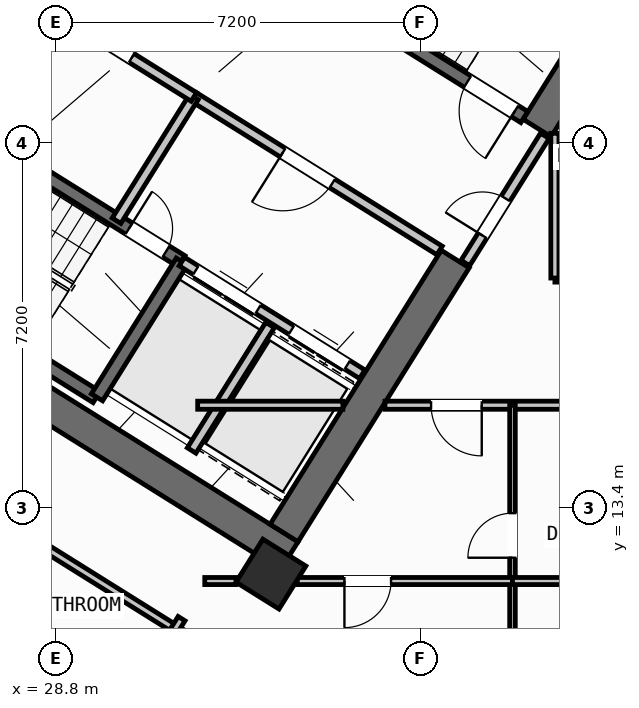
"""IFC4 building model, lengths in metres.
Left out: names, types, materials, properties, quantities, classifications, styles, units other than length and angle.
Written with IfcOpenShell. Run it as: python <this file> out.ifc"""

import sys

from ifc_helpers import new_model, si_unit, direction, frame, frame_2d, origin, origin_2d, place, context, subcontext, project, spatial, rectangle, hollow_rectangle, extrude, source, transform, mapped, element, fill, save


model = new_model("IFC4")
c1 = context("Model", 3, precision=1e-05, world=origin(), true_north=direction((0.0, 1.0)))
c2 = subcontext(c1, "Body", "Model", "MODEL_VIEW")
j1 = project(units=[si_unit("LENGTHUNIT", "METRE"), si_unit("PLANEANGLEUNIT", "RADIAN")], contexts=[c1])
p1 = place(None, origin())
s1 = spatial("IfcSite", under=j1, at=p1, CompositionType="ELEMENT")
p2 = place(p1, origin())
s2 = spatial("IfcBuilding", under=s1, at=p2, CompositionType="ELEMENT")
p3 = place(p2, frame((0.0, 0.0, 56.4)))
s3 = spatial("IfcBuildingStorey", under=s2, at=p3, CompositionType="ELEMENT", Elevation=56.4)
p4 = place(p3, frame((33.409, 12.45, 0.0), z_axis=(0.0, 0.0, 1.0), x_axis=(-0.848051132073, 0.529914405721, 0.0)))
e1 = element("IfcWall", 1, at=p4, inside=s3, PredefinedType="SHEAR", context=c2, shape_type="SweptSolid", body=[
    extrude(rectangle(XDim=13.24, YDim=0.65, at=frame_2d((6.62, 0.0))), origin(), (0.0, 0.0, 1.0), 3.35),
])
p5 = place(p3, frame((40.168, 23.88, 0.0), z_axis=(0.0, 0.0, 1.0), x_axis=(-0.529893103397, -0.8480644427, 0.0)))
e2 = element("IfcWall", 2, at=p5, inside=s3, PredefinedType="SHEAR", context=c2, shape_type="SweptSolid", body=[
    extrude(rectangle(XDim=3.525, YDim=0.65, at=frame_2d((1.763, 0.0))), origin(), (0.0, 0.0, 1.0), 3.35),
])
p6 = place(p3, frame((36.683, 18.304, 0.0), z_axis=(0.0, 0.0, 1.0), x_axis=(-0.529899109053, -0.848060690178, 0.0)))
e3 = element("IfcWall", 3, at=p6, inside=s3, PredefinedType="SHEAR", context=c2, shape_type="SweptSolid", body=[
    extrude(rectangle(XDim=6.375, YDim=0.65, at=frame_2d((3.188, 0.0))), origin(), (0.0, 0.0, 1.0), 3.35),
])
m1 = source(origin(), c2, "Body", "SweptSolid", [
    extrude(hollow_rectangle(XDim=1.0, YDim=1.0, WallThickness=0.04, at=origin_2d()), origin(), (0.0, 0.0, 1.0), 3.6),
])
p7 = place(p3, frame((33.046, 12.087, 0.0), z_axis=(0.0, 0.0, 1.0), x_axis=(-0.848048096156, 0.529919264233, 0.0)))
e4 = element("IfcColumn", 4, at=p7, inside=s3, PredefinedType="COLUMN", context=c2, shape_type="MappedRepresentation", body=[
    mapped(m1, transform((0.0, 0.0, 0.0), scale=1.0)),
])
p8 = place(p3, frame((29.268, 6.429, 0.0), z_axis=(0.0, 0.0, 1.0), x_axis=(-0.848049971435, 0.529916263149, 0.0)))
e5 = element("IfcWall", 5, at=p8, inside=s3, PredefinedType="STANDARD", context=c2, shape_type="SweptSolid", body=[
    extrude(rectangle(XDim=31.588, YDim=0.32, at=frame_2d((15.794, 0.0))), origin(), (0.0, 0.0, 1.0), 3.35),
])
p9 = place(p8, frame((16.235, 0.0, 0.0)))
e6 = element("IfcOpeningElement", 6, at=p9, cuts=e5, PredefinedType="OPENING", context=c2, shape_type="SweptSolid", body=[
    extrude(rectangle(XDim=1.2, YDim=2.15, at=frame_2d((0.6, 1.075))), frame((0.0, 0.17, 0.0), z_axis=(0.0, -1.0, 0.0), x_axis=(1.0, 0.0, 0.0)), (0.0, 0.0, 1.0), 0.34),
])
p10 = place(p8, frame((2.989, 0.0, 0.8)))
e7 = element("IfcOpeningElement", 7, at=p10, cuts=e5, PredefinedType="OPENING", context=c2, shape_type="SweptSolid", body=[
    extrude(rectangle(XDim=2.1, YDim=1.55, at=frame_2d((1.05, 0.775))), frame((0.0, 0.17, 0.0), z_axis=(0.0, -1.0, 0.0), x_axis=(1.0, 0.0, 0.0)), (0.0, 0.0, 1.0), 0.34),
])
p11 = place(p8, frame((8.359, 0.0, 0.8)))
e8 = element("IfcOpeningElement", 8, at=p11, cuts=e5, PredefinedType="OPENING", context=c2, shape_type="SweptSolid", body=[
    extrude(rectangle(XDim=2.1, YDim=1.55, at=frame_2d((1.05, 0.775))), frame((0.0, 0.17, 0.0), z_axis=(0.0, -1.0, 0.0), x_axis=(1.0, 0.0, 0.0)), (0.0, 0.0, 1.0), 0.34),
])
p12 = place(p8, frame((13.284, 0.0, 0.95)))
e9 = element("IfcOpeningElement", 9, at=p12, cuts=e5, PredefinedType="OPENING", context=c2, shape_type="SweptSolid", body=[
    extrude(rectangle(XDim=1.2, YDim=1.4, at=frame_2d((0.6, 0.7))), frame((0.0, 0.17, 0.0), z_axis=(0.0, -1.0, 0.0), x_axis=(1.0, 0.0, 0.0)), (0.0, 0.0, 1.0), 0.34),
])
p13 = place(p8, frame((22.374, 0.0, 0.95)))
e10 = element("IfcOpeningElement", 10, at=p13, cuts=e5, PredefinedType="OPENING", context=c2, shape_type="SweptSolid", body=[
    extrude(rectangle(XDim=1.2, YDim=1.4, at=frame_2d((0.6, 0.7))), frame((0.0, 0.17, 0.0), z_axis=(0.0, -1.0, 0.0), x_axis=(1.0, 0.0, 0.0)), (0.0, 0.0, 1.0), 0.34),
])
p14 = place(p8, frame((26.351, 0.0, 1.0)))
e11 = element("IfcOpeningElement", 11, at=p14, cuts=e5, PredefinedType="OPENING", context=c2, shape_type="SweptSolid", body=[
    extrude(rectangle(XDim=0.9, YDim=1.25, at=frame_2d((0.45, 0.625))), frame((0.0, 0.17, 0.0), z_axis=(0.0, -1.0, 0.0), x_axis=(1.0, 0.0, 0.0)), (0.0, 0.0, 1.0), 0.34),
])
p15 = place(p8, frame((29.052, 0.0, 0.85)))
e12 = element("IfcOpeningElement", 12, at=p15, cuts=e5, PredefinedType="OPENING", context=c2, shape_type="SweptSolid", body=[
    extrude(rectangle(XDim=1.8, YDim=1.5, at=frame_2d((0.9, 0.75))), frame((0.0, 0.17, 0.0), z_axis=(0.0, -1.0, 0.0), x_axis=(1.0, 0.0, 0.0)), (0.0, 0.0, 1.0), 0.34),
])
p16 = place(p3, frame((29.605, 15.581, 0.0), z_axis=(0.0, 0.0, 1.0), x_axis=(-0.848036911448, 0.529937163087, 0.0)))
e13 = element("IfcWall", 13, at=p16, inside=s3, PredefinedType="SHEAR", context=c2, shape_type="SweptSolid", body=[
    extrude(rectangle(XDim=7.46, YDim=0.26, at=frame_2d((3.73, 0.0))), origin(), (0.0, 0.0, 1.0), 3.35),
])
p17 = place(p3, frame((31.28, 18.261, 0.0), z_axis=(0.0, 0.0, 1.0), x_axis=(-0.848051618787, 0.529913626805, 0.0)))
e14 = element("IfcWall", 14, at=p17, inside=s3, PredefinedType="SHEAR", context=c2, shape_type="SweptSolid", body=[
    extrude(rectangle(XDim=7.46, YDim=0.26, at=frame_2d((3.73, 0.0))), origin(), (0.0, 0.0, 1.0), 3.35),
])
p18 = place(p17, frame((0.36, 0.0, 0.0)))
e15 = element("IfcOpeningElement", 15, at=p18, cuts=e14, PredefinedType="OPENING", context=c2, shape_type="SweptSolid", body=[
    extrude(rectangle(XDim=0.86, YDim=2.05, at=frame_2d((0.43, 1.025))), frame((0.0, 0.14, 0.0), z_axis=(0.0, -1.0, 0.0), x_axis=(1.0, 0.0, 0.0)), (0.0, 0.0, 1.0), 0.28),
])
p19 = place(p3, frame((31.288, 18.256, 0.0), z_axis=(0.0, 0.0, 1.0), x_axis=(-0.529943379326, -0.848033026897, 0.0)))
e16 = element("IfcWall", 16, at=p19, inside=s3, PredefinedType="SHEAR", context=c2, shape_type="SweptSolid", body=[
    extrude(rectangle(XDim=3.16, YDim=0.26, at=frame_2d((1.58, 0.0))), origin(), (0.0, 0.0, 1.0), 3.35),
])
p20 = place(p3, frame((38.046, 21.108, 0.0), z_axis=(0.0, 0.0, 1.0), x_axis=(-0.848054434086, 0.529909121291, 0.0)))
e17 = element("IfcWall", 17, at=p20, inside=s3, PredefinedType="SHEAR", context=c2, shape_type="SweptSolid", body=[
    extrude(rectangle(XDim=7.33, YDim=0.26, at=frame_2d((3.665, 0.0))), origin(), (0.0, 0.0, 1.0), 3.35),
])
p21 = place(p20, frame((0.22, 0.0, 0.0)))
e18 = element("IfcOpeningElement", 18, at=p21, cuts=e17, PredefinedType="OPENING", context=c2, shape_type="SweptSolid", body=[
    extrude(rectangle(XDim=1.1, YDim=2.1, at=frame_2d((0.55, 1.05))), frame((0.0, 0.14, 0.0), z_axis=(0.0, -1.0, 0.0), x_axis=(1.0, 0.0, 0.0)), (0.0, 0.0, 1.0), 0.28),
])
p22 = place(p3, frame((34.848, 16.031, 0.0), z_axis=(0.0, 0.0, 1.0), x_axis=(-0.848044042236, 0.529925751807, 0.0)))
e19 = element("IfcWall", 19, at=p22, inside=s3, PredefinedType="STANDARD", context=c2, shape_type="SweptSolid", body=[
    extrude(rectangle(XDim=4.198, YDim=0.2, at=frame_2d((2.099, 0.0))), origin(), (0.0, 0.0, 1.0), 3.34),
])
p23 = place(p22, frame((0.348, 0.0, 0.0)))
e20 = element("IfcOpeningElement", 20, at=p23, cuts=e19, PredefinedType="OPENING", context=c2, shape_type="SweptSolid", body=[
    extrude(rectangle(XDim=1.3, YDim=2.2, at=frame_2d((0.65, 1.1))), frame((0.0, 0.11, 0.0), z_axis=(0.0, -1.0, 0.0), x_axis=(1.0, 0.0, 0.0)), (0.0, 0.0, 1.0), 0.22),
])
p24 = place(p22, frame((2.423, 0.0, 0.0)))
e21 = element("IfcOpeningElement", 21, at=p24, cuts=e19, PredefinedType="OPENING", context=c2, shape_type="SweptSolid", body=[
    extrude(rectangle(XDim=1.45, YDim=2.25, at=frame_2d((0.725, 1.125))), frame((0.0, 0.11, 0.0), z_axis=(0.0, -1.0, 0.0), x_axis=(1.0, 0.0, 0.0)), (0.0, 0.0, 1.0), 0.22),
])
p25 = place(p3, frame((36.374, 18.474, 0.0), z_axis=(0.0, 0.0, 1.0), x_axis=(-0.848051071577, 0.529914502535, 0.0)))
e22 = element("IfcWall", 22, at=p25, inside=s3, PredefinedType="STANDARD", context=c2, shape_type="SweptSolid", body=[
    extrude(rectangle(XDim=5.718, YDim=0.2, at=frame_2d((2.859, 0.0))), origin(), (0.0, 0.0, 1.0), 3.34),
])
p26 = place(p25, frame((2.498, 0.0, 0.0)))
e23 = element("IfcOpeningElement", 23, at=p26, cuts=e22, PredefinedType="OPENING", context=c2, shape_type="SweptSolid", body=[
    extrude(rectangle(XDim=1.15, YDim=2.1, at=frame_2d((0.575, 1.05))), frame((0.0, 0.11, 0.0), z_axis=(0.0, -1.0, 0.0), x_axis=(1.0, 0.0, 0.0)), (0.0, 0.0, 1.0), 0.22),
])
p27 = place(p3, frame((33.029, 17.003, 0.0), z_axis=(0.0, 0.0, 1.0), x_axis=(-0.529916267533, -0.848049968695, 0.0)))
e24 = element("IfcWall", 24, at=p27, inside=s3, PredefinedType="STANDARD", context=c2, shape_type="SweptSolid", body=[
    extrude(rectangle(XDim=2.92, YDim=0.2, at=frame_2d((1.46, 0.0))), origin(), (0.0, 0.0, 1.0), 3.34),
])
for number, where, z_axis, x_axis in (
    (25, (31.525, 21.504, 0.0), (0.0, 0.0, 1.0), (-0.53, -0.848, 0.0)),
    (26, (28.71, 23.263, 0.0), (0.0, 0.0, 1.0), (-0.53, -0.848, 0.0)),
):
    element("IfcWall", number, at=place(p3, frame(where, z_axis=z_axis, x_axis=x_axis)), inside=s3, PredefinedType="STANDARD", context=c2, shape_type="SweptSolid", body=[
        extrude(rectangle(XDim=2.88, YDim=0.2, at=frame_2d((1.44, 0.0))), origin(), (0.0, 0.0, 1.0), 3.34),
    ])
p28 = place(p3, frame((31.525, 21.504, 0.0), z_axis=(0.0, 0.0, 1.0), x_axis=(-0.848044998614, 0.529924221305, 0.0)))
e27 = element("IfcWall", 27, at=p28, inside=s3, PredefinedType="STANDARD", context=c2, shape_type="SweptSolid", body=[
    extrude(rectangle(XDim=6.168, YDim=0.2, at=frame_2d((3.084, 0.0))), origin(), (0.0, 0.0, 1.0), 3.34),
])
p29 = place(p28, frame((4.4, 0.0, 0.0)))
e28 = element("IfcOpeningElement", 28, at=p29, cuts=e27, PredefinedType="OPENING", context=c2, shape_type="SweptSolid", body=[
    extrude(rectangle(XDim=0.86, YDim=2.05, at=frame_2d((0.43, 1.025))), frame((0.0, 0.11, 0.0), z_axis=(0.0, -1.0, 0.0), x_axis=(1.0, 0.0, 0.0)), (0.0, 0.0, 1.0), 0.22),
])
p30 = place(p28, frame((1.45, 0.0, 0.0)))
e29 = element("IfcOpeningElement", 29, at=p30, cuts=e27, PredefinedType="OPENING", context=c2, shape_type="SweptSolid", body=[
    extrude(rectangle(XDim=0.86, YDim=2.05, at=frame_2d((0.43, 1.025))), frame((0.0, 0.11, 0.0), z_axis=(0.0, -1.0, 0.0), x_axis=(1.0, 0.0, 0.0)), (0.0, 0.0, 1.0), 0.22),
])
p31 = place(p3, frame((32.164, 10.374, 0.0), z_axis=(0.0, 0.0, 1.0), x_axis=(-0.848044107957, 0.529925646633, 0.0)))
e30 = element("IfcWall", 30, at=p31, inside=s3, PredefinedType="PARTITIONING", context=c2, shape_type="SweptSolid", body=[
    extrude(rectangle(XDim=15.57, YDim=0.16, at=frame_2d((7.785, 0.0))), origin(), (0.0, 0.0, 1.0), 3.34),
])
p32 = place(p31, frame((10.83, 0.0, 0.0)))
e31 = element("IfcOpeningElement", 31, at=p32, cuts=e30, PredefinedType="OPENING", context=c2, shape_type="SweptSolid", body=[
    extrude(rectangle(XDim=1.0, YDim=2.1, at=frame_2d((0.5, 1.05))), frame((0.0, 0.09, 0.0), z_axis=(0.0, -1.0, 0.0), x_axis=(1.0, 0.0, 0.0)), (0.0, 0.0, 1.0), 0.18),
])
p33 = place(p3, frame((31.282, 11.208, 0.0), z_axis=(0.0, 0.0, 1.0), x_axis=(-0.529938869374, -0.84803584519, 0.0)))
e32 = element("IfcWall", 32, at=p33, inside=s3, PredefinedType="PARTITIONING", context=c2, shape_type="SweptSolid", body=[
    extrude(rectangle(XDim=5.48, YDim=0.16, at=frame_2d((2.74, 0.0))), origin(), (0.0, 0.0, 1.0), 3.34),
])
p34 = place(p3, frame((29.72, 8.859, 0.0), z_axis=(0.0, 0.0, 1.0), x_axis=(-0.848049134363, 0.529917602752, 0.0)))
e33 = element("IfcWall", 33, at=p34, inside=s3, PredefinedType="PLUMBINGWALL", context=c2, shape_type="SweptSolid", body=[
    extrude(rectangle(XDim=14.3, YDim=0.14, at=frame_2d((7.15, 0.0))), origin(), (0.0, 0.0, 1.0), 3.34),
])
p35 = place(p34, frame((9.57, 0.0, 0.0)))
e34 = element("IfcOpeningElement", 34, at=p35, cuts=e33, PredefinedType="OPENING", context=c2, shape_type="SweptSolid", body=[
    extrude(rectangle(XDim=0.92, YDim=2.08, at=frame_2d((0.46, 1.04))), frame((0.0, 0.08, 0.0), z_axis=(0.0, -1.0, 0.0), x_axis=(1.0, 0.0, 0.0)), (0.0, 0.0, 1.0), 0.16),
])
p36 = place(p3, frame((38.451, 20.737, 0.0), z_axis=(0.0, 0.0, 1.0), x_axis=(-0.529924799939, -0.848044637038, 0.0)))
e35 = element("IfcWall", 35, at=p36, inside=s3, PredefinedType="STANDARD", context=c2, shape_type="SweptSolid", body=[
    extrude(rectangle(XDim=2.96, YDim=0.2, at=frame_2d((1.48, 0.0))), origin(), (0.0, 0.0, 1.0), 3.34),
])
p37 = place(p36, frame((1.46, 0.0, 0.0)))
e36 = element("IfcOpeningElement", 36, at=p37, cuts=e35, PredefinedType="OPENING", context=c2, shape_type="SweptSolid", body=[
    extrude(rectangle(XDim=0.86, YDim=2.05, at=frame_2d((0.43, 1.025))), frame((0.0, 0.11, 0.0), z_axis=(0.0, -1.0, 0.0), x_axis=(1.0, 0.0, 0.0)), (0.0, 0.0, 1.0), 0.22),
])
p38 = place(p3, frame((31.6, 15.42, 0.0), z_axis=(0.0, 0.0, 1.0), x_axis=(1.0, 0.0, 0.0)))
e37 = element("IfcWall", 37, at=p38, inside=s3, PredefinedType="PARTITIONING", context=c2, shape_type="SweptSolid", body=[
    extrude(rectangle(XDim=2.866, YDim=0.16, at=frame_2d((1.433, 0.0))), origin(), (0.0, 0.0, 1.0), 3.34),
])
p39 = place(p3, frame((35.296, 15.42, 0.0), z_axis=(0.0, 0.0, 1.0), x_axis=(1.0, 0.0, 0.0)))
e38 = element("IfcWall", 38, at=p39, inside=s3, PredefinedType="PARTITIONING", context=c2, shape_type="SweptSolid", body=[
    extrude(rectangle(XDim=15.311, YDim=0.16, at=frame_2d((7.655, 0.0))), origin(), (0.0, 0.0, 1.0), 3.34),
])
p40 = place(p39, frame((0.91, 0.0, 0.0)))
e39 = element("IfcOpeningElement", 39, at=p40, cuts=e38, PredefinedType="OPENING", context=c2, shape_type="SweptSolid", body=[
    extrude(rectangle(XDim=1.0, YDim=2.1, at=frame_2d((0.5, 1.05))), frame((0.0, 0.09, 0.0), z_axis=(0.0, -1.0, 0.0), x_axis=(1.0, 0.0, 0.0)), (0.0, 0.0, 1.0), 0.18),
])
p41 = place(p39, frame((8.74, 0.0, 0.0)))
e40 = element("IfcOpeningElement", 40, at=p41, cuts=e38, PredefinedType="OPENING", context=c2, shape_type="SweptSolid", body=[
    extrude(rectangle(XDim=1.0, YDim=2.1, at=frame_2d((0.5, 1.05))), frame((0.0, 0.09, 0.0), z_axis=(0.0, -1.0, 0.0), x_axis=(1.0, 0.0, 0.0)), (0.0, 0.0, 1.0), 0.18),
])
p42 = place(p3, frame((38.65, 17.93, 0.0), z_axis=(0.0, 0.0, 1.0), x_axis=(1.0, 0.0, 0.0)))
e41 = element("IfcWall", 41, at=p42, inside=s3, PredefinedType="PARTITIONING", context=c2, shape_type="SweptSolid", body=[
    extrude(rectangle(XDim=9.95, YDim=0.16, at=frame_2d((4.975, 0.0))), origin(), (0.0, 0.0, 1.0), 3.34),
])
p43 = place(p42, frame((4.475, 0.0, 0.0)))
e42 = element("IfcOpeningElement", 42, at=p43, cuts=e41, PredefinedType="OPENING", context=c2, shape_type="SweptSolid", body=[
    extrude(rectangle(XDim=1.0, YDim=2.1, at=frame_2d((0.5, 1.05))), frame((0.0, 0.09, 0.0), z_axis=(0.0, -1.0, 0.0), x_axis=(1.0, 0.0, 0.0)), (0.0, 0.0, 1.0), 0.18),
])
p44 = place(p3, frame((38.65, 17.93, 0.0), z_axis=(0.0, 0.0, 1.0), x_axis=(0.0, 1.0, 0.0)))
e43 = element("IfcWall", 43, at=p44, inside=s3, PredefinedType="PARTITIONING", context=c2, shape_type="SweptSolid", body=[
    extrude(rectangle(XDim=2.857, YDim=0.16, at=frame_2d((1.428, 0.0))), origin(), (0.0, 0.0, 1.0), 3.34),
])
p45 = place(p3, frame((37.813, 1.96, 0.0), z_axis=(0.0, 0.0, 1.0), x_axis=(0.0, 1.0, 0.0)))
e44 = element("IfcWall", 44, at=p45, inside=s3, PredefinedType="PARTITIONING", context=c2, shape_type="SweptSolid", body=[
    extrude(rectangle(XDim=13.46, YDim=0.11, at=frame_2d((6.73, 0.0))), origin(), (0.0, 0.0, 1.0), 3.34),
])
p46 = place(p45, frame((5.5, 0.0, 0.0)))
e45 = element("IfcOpeningElement", 45, at=p46, cuts=e44, PredefinedType="OPENING", context=c2, shape_type="SweptSolid", body=[
    extrude(rectangle(XDim=0.92, YDim=2.08, at=frame_2d((0.46, 1.04))), frame((0.0, 0.065, 0.0), z_axis=(0.0, -1.0, 0.0), x_axis=(1.0, 0.0, 0.0)), (0.0, 0.0, 1.0), 0.13),
])
p47 = place(p45, frame((10.45, 0.0, 0.0)))
e46 = element("IfcOpeningElement", 46, at=p47, cuts=e44, PredefinedType="OPENING", context=c2, shape_type="SweptSolid", body=[
    extrude(rectangle(XDim=0.88, YDim=2.08, at=frame_2d((0.44, 1.04))), frame((0.0, 0.065, 0.0), z_axis=(0.0, -1.0, 0.0), x_axis=(1.0, 0.0, 0.0)), (0.0, 0.0, 1.0), 0.13),
])
p48 = place(p3, frame((31.74, 11.95, 0.0), z_axis=(0.0, 0.0, 1.0), x_axis=(1.0, 0.0, 0.0)))
e47 = element("IfcWall", 47, at=p48, inside=s3, PredefinedType="PLUMBINGWALL", context=c2, shape_type="SweptSolid", body=[
    extrude(rectangle(XDim=0.617, YDim=0.14, at=frame_2d((0.309, 0.0))), origin(), (0.0, 0.0, 1.0), 3.34),
])
p49 = place(p3, frame((33.564, 11.95, 0.0), z_axis=(0.0, 0.0, 1.0), x_axis=(1.0, 0.0, 0.0)))
e48 = element("IfcWall", 48, at=p49, inside=s3, PredefinedType="PLUMBINGWALL", context=c2, shape_type="SweptSolid", body=[
    extrude(rectangle(XDim=4.249, YDim=0.14, at=frame_2d((2.124, 0.0))), origin(), (0.0, 0.0, 1.0), 2.525),
])
p50 = place(p49, frame((0.932, 0.0, 0.0)))
e49 = element("IfcOpeningElement", 49, at=p50, cuts=e48, PredefinedType="OPENING", context=c2, shape_type="SweptSolid", body=[
    extrude(rectangle(XDim=0.92, YDim=2.08, at=frame_2d((0.46, 1.04))), frame((0.0, 0.08, 0.0), z_axis=(0.0, -1.0, 0.0), x_axis=(1.0, 0.0, 0.0)), (0.0, 0.0, 1.0), 0.16),
])
p51 = place(p3, frame((37.813, 11.95, 0.0), z_axis=(0.0, 0.0, 1.0), x_axis=(1.0, 0.0, 0.0)))
e50 = element("IfcWall", 50, at=p51, inside=s3, PredefinedType="PLUMBINGWALL", context=c2, shape_type="SweptSolid", body=[
    extrude(rectangle(XDim=4.137, YDim=0.14, at=frame_2d((2.068, 0.0))), origin(), (0.0, 0.0, 1.0), 2.525),
])
m2 = source(origin(), c2, "Body", "SweptSolid", [
    extrude(rectangle(XDim=0.86, YDim=2.05, at=frame_2d((0.43, 1.025))), frame((0.0, 0.025, 0.0), z_axis=(0.0, -1.0, 0.0), x_axis=(1.0, 0.0, 0.0)), (0.0, 0.0, 1.0), 0.05),
])
p52 = place(p18, frame((0.86, 0.0, 0.0), z_axis=(0.0, 0.0, 1.0), x_axis=(-1.0, 0.0, 0.0)))
e51 = element("IfcDoor", 51, at=p52, inside=s3, OperationType="SINGLE_SWING_LEFT", PredefinedType="DOOR", context=c2, shape_type="MappedRepresentation", body=[
    mapped(m2, transform((0.0, 0.0, 0.0), scale=1.0)),
])
fill(e15, e51)
m3 = source(origin(), c2, "Body", "SweptSolid", [
    extrude(rectangle(XDim=1.1, YDim=2.1, at=frame_2d((0.55, 1.05))), frame((0.0, 0.025, 0.0), z_axis=(0.0, -1.0, 0.0), x_axis=(1.0, 0.0, 0.0)), (0.0, 0.0, 1.0), 0.05),
])
p53 = place(p21, origin())
e52 = element("IfcDoor", 52, at=p53, inside=s3, OperationType="SINGLE_SWING_LEFT", PredefinedType="DOOR", context=c2, shape_type="MappedRepresentation", body=[
    mapped(m3, transform((0.0, 0.0, 0.0), scale=1.0)),
])
fill(e18, e52)
m4 = source(origin(), c2, "Body", "SweptSolid", [
    extrude(rectangle(XDim=1.15, YDim=2.1, at=frame_2d((0.575, 1.05))), frame((0.0, 0.025, 0.0), z_axis=(0.0, -1.0, 0.0), x_axis=(1.0, 0.0, 0.0)), (0.0, 0.0, 1.0), 0.05),
])
p54 = place(p26, origin())
e53 = element("IfcDoor", 53, at=p54, inside=s3, OperationType="SINGLE_SWING_RIGHT", PredefinedType="DOOR", context=c2, shape_type="MappedRepresentation", body=[
    mapped(m4, transform((0.0, 0.0, 0.0), scale=1.0)),
])
fill(e23, e53)
m5 = source(origin(), c2, "Body", "SweptSolid", [
    extrude(rectangle(XDim=1.3, YDim=2.2, at=frame_2d((0.65, 1.1))), frame((0.0, 0.025, 0.0), z_axis=(0.0, -1.0, 0.0), x_axis=(1.0, 0.0, 0.0)), (0.0, 0.0, 1.0), 0.05),
])
p55 = place(p23, origin())
e54 = element("IfcDoor", 54, at=p55, inside=s3, OperationType="DOUBLE_DOOR_SLIDING", PredefinedType="DOOR", context=c2, shape_type="MappedRepresentation", body=[
    mapped(m5, transform((0.0, 0.0, 0.0), scale=1.0)),
])
fill(e20, e54)
m6 = source(origin(), c2, "Body", "SweptSolid", [
    extrude(rectangle(XDim=1.45, YDim=2.25, at=frame_2d((0.725, 1.125))), frame((0.0, 0.025, 0.0), z_axis=(0.0, -1.0, 0.0), x_axis=(1.0, 0.0, 0.0)), (0.0, 0.0, 1.0), 0.05),
])
p56 = place(p24, origin())
e55 = element("IfcDoor", 55, at=p56, inside=s3, OperationType="DOUBLE_DOOR_SLIDING", PredefinedType="DOOR", context=c2, shape_type="MappedRepresentation", body=[
    mapped(m6, transform((0.0, 0.0, 0.0), scale=1.0)),
])
fill(e21, e55)
p57 = place(p30, frame((0.86, 0.0, 0.0), z_axis=(0.0, 0.0, 1.0), x_axis=(-1.0, 0.0, 0.0)))
e56 = element("IfcDoor", 56, at=p57, inside=s3, OperationType="SINGLE_SWING_RIGHT", PredefinedType="DOOR", context=c2, shape_type="MappedRepresentation", body=[
    mapped(m2, transform((0.0, 0.0, 0.0), scale=1.0)),
])
fill(e29, e56)
p58 = place(p37, frame((0.86, 0.0, 0.0), z_axis=(0.0, 0.0, 1.0), x_axis=(-1.0, 0.0, 0.0)))
e57 = element("IfcDoor", 57, at=p58, inside=s3, OperationType="SINGLE_SWING_LEFT", PredefinedType="DOOR", context=c2, shape_type="MappedRepresentation", body=[
    mapped(m2, transform((0.0, 0.0, 0.0), scale=1.0)),
])
fill(e36, e57)
m7 = source(origin(), c2, "Body", "SweptSolid", [
    extrude(rectangle(XDim=1.0, YDim=2.1, at=frame_2d((0.5, 1.05))), frame((0.0, 0.025, 0.0), z_axis=(0.0, -1.0, 0.0), x_axis=(1.0, 0.0, 0.0)), (0.0, 0.0, 1.0), 0.05),
])
p59 = place(p40, frame((1.0, 0.0, 0.0), z_axis=(0.0, 0.0, 1.0), x_axis=(-1.0, 0.0, 0.0)))
e58 = element("IfcDoor", 58, at=p59, inside=s3, OperationType="SINGLE_SWING_LEFT", PredefinedType="DOOR", context=c2, shape_type="MappedRepresentation", body=[
    mapped(m7, transform((0.0, 0.0, 0.0), scale=1.0)),
])
fill(e39, e58)
m8 = source(origin(), c2, "Body", "SweptSolid", [
    extrude(rectangle(XDim=0.92, YDim=2.08, at=frame_2d((0.46, 1.04))), frame((0.0, 0.025, 0.0), z_axis=(0.0, -1.0, 0.0), x_axis=(1.0, 0.0, 0.0)), (0.0, 0.0, 1.0), 0.05),
])
p60 = place(p50, frame((0.92, 0.0, 0.0), z_axis=(0.0, 0.0, 1.0), x_axis=(-1.0, 0.0, 0.0)))
e59 = element("IfcDoor", 59, at=p60, inside=s3, OperationType="SINGLE_SWING_RIGHT", PredefinedType="DOOR", context=c2, shape_type="MappedRepresentation", body=[
    mapped(m8, transform((0.0, 0.0, 0.0), scale=1.0)),
])
fill(e49, e59)
m9 = source(origin(), c2, "Body", "SweptSolid", [
    extrude(rectangle(XDim=0.88, YDim=2.08, at=frame_2d((0.44, 1.04))), frame((0.0, 0.025, 0.0), z_axis=(0.0, -1.0, 0.0), x_axis=(1.0, 0.0, 0.0)), (0.0, 0.0, 1.0), 0.05),
])
p61 = place(p47, origin())
e60 = element("IfcDoor", 60, at=p61, inside=s3, OperationType="SINGLE_SWING_LEFT", PredefinedType="DOOR", context=c2, shape_type="MappedRepresentation", body=[
    mapped(m9, transform((0.0, 0.0, 0.0), scale=1.0)),
])
fill(e46, e60)
save(model, sys.argv[1])
